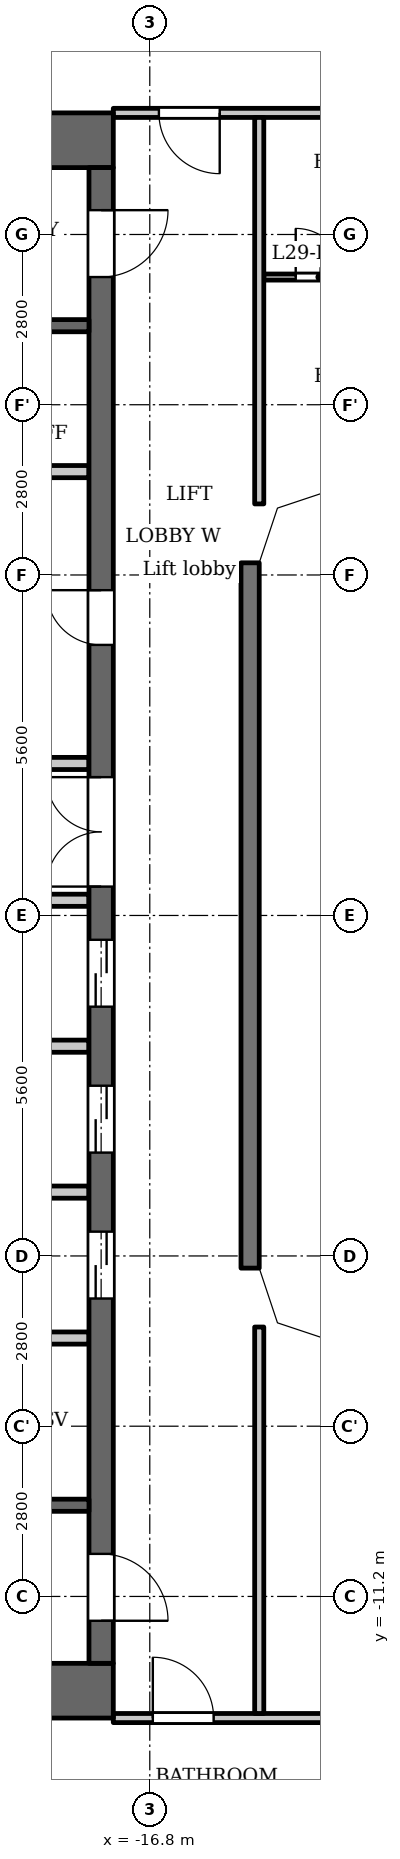
"""IFC4 building model, lengths in metres.
Left out: names, types, materials, properties, quantities, classifications, styles, units other than length and angle.
Written with IfcOpenShell. Run it as: python <this file> out.ifc"""

import sys

from ifc_helpers import new_model, si_unit, direction, frame, frame_2d, origin, place, context, subcontext, project, spatial, polyline, rectangle, outline, extrude, element, fill, save


model = new_model("IFC4")
c1 = context("Model", 3, precision=1e-05, world=origin(), true_north=direction((0.0, 1.0)))
c2 = subcontext(c1, "Body", "Model", "MODEL_VIEW")
j1 = project(units=[si_unit("LENGTHUNIT", "METRE"), si_unit("PLANEANGLEUNIT", "RADIAN")], contexts=[c1])
p1 = place(None, origin())
s1 = spatial("IfcSite", under=j1, at=p1, CompositionType="ELEMENT")
p2 = place(p1, origin())
s2 = spatial("IfcBuilding", under=s1, at=p2, CompositionType="ELEMENT")
p3 = place(p2, frame((0.0, 0.0, 114.8)))
s3 = spatial("IfcBuildingStorey", under=s2, at=p3, CompositionType="ELEMENT", Elevation=114.8)
p4 = place(p3, frame((-15.15, -5.8, 0.0), z_axis=(0.0, 0.0, 1.0), x_axis=(0.0, 1.0, 0.0)))
e1 = element("IfcWall", 1, at=p4, inside=s3, PredefinedType="SOLIDWALL", context=c2, shape_type="SweptSolid", body=[
    extrude(rectangle(XDim=11.6, YDim=0.3, at=frame_2d((5.8, 0.0))), origin(), (0.0, 0.0, 1.0), 3.2),
])
for number, where, z_axis, x_axis in (
    (2, (-17.4, 12.75, 0.0), (0.0, 0.0, 1.0), (-1.0, 0.0, 0.0)),
    (3, (-17.4, -12.75, 0.0), (0.0, 0.0, 1.0), (-1.0, 0.0, 0.0)),
):
    element("IfcWall", number, at=place(p3, frame(where, z_axis=z_axis, x_axis=x_axis)), inside=s3, PredefinedType="SHEAR", context=c2, shape_type="SweptSolid", body=[
        extrude(rectangle(XDim=10.4, YDim=0.9, at=frame_2d((5.2, 0.0))), origin(), (0.0, 0.0, 1.0), 3.2),
    ])
p5 = place(p3, frame((-17.6, -12.3, 0.0), z_axis=(0.0, 0.0, 1.0), x_axis=(0.0, 1.0, 0.0)))
e4 = element("IfcWall", 4, at=p5, inside=s3, PredefinedType="SHEAR", context=c2, shape_type="SweptSolid", body=[
    extrude(rectangle(XDim=24.6, YDim=0.4, at=frame_2d((12.3, 0.0))), origin(), (0.0, 0.0, 1.0), 3.2),
])
p6 = place(p5, frame((6.0, 0.0, 0.0)))
e5 = element("IfcOpeningElement", 5, at=p6, cuts=e4, PredefinedType="OPENING", context=c2, shape_type="SweptSolid", body=[
    extrude(rectangle(XDim=1.1, YDim=2.1, at=frame_2d((0.55, 1.05))), frame((0.0, 0.21, 0.0), z_axis=(0.0, -1.0, 0.0), x_axis=(1.0, 0.0, 0.0)), (0.0, 0.0, 1.0), 0.42),
])
p7 = place(p5, frame((8.4, 0.0, 0.0)))
e6 = element("IfcOpeningElement", 6, at=p7, cuts=e4, PredefinedType="OPENING", context=c2, shape_type="SweptSolid", body=[
    extrude(rectangle(XDim=1.1, YDim=2.1, at=frame_2d((0.55, 1.05))), frame((0.0, 0.21, 0.0), z_axis=(0.0, -1.0, 0.0), x_axis=(1.0, 0.0, 0.0)), (0.0, 0.0, 1.0), 0.42),
])
p8 = place(p5, frame((10.8, 0.0, 0.0)))
e7 = element("IfcOpeningElement", 7, at=p8, cuts=e4, PredefinedType="OPENING", context=c2, shape_type="SweptSolid", body=[
    extrude(rectangle(XDim=1.1, YDim=2.1, at=frame_2d((0.55, 1.05))), frame((0.0, 0.21, 0.0), z_axis=(0.0, -1.0, 0.0), x_axis=(1.0, 0.0, 0.0)), (0.0, 0.0, 1.0), 0.42),
])
p9 = place(p5, frame((16.75, 0.0, 0.0)))
e8 = element("IfcOpeningElement", 8, at=p9, cuts=e4, PredefinedType="OPENING", context=c2, shape_type="SweptSolid", body=[
    extrude(rectangle(XDim=0.9, YDim=2.1, at=frame_2d((0.45, 1.05))), frame((0.0, 0.21, 0.0), z_axis=(0.0, -1.0, 0.0), x_axis=(1.0, 0.0, 0.0)), (0.0, 0.0, 1.0), 0.42),
])
p10 = place(p5, frame((22.8, 0.0, 0.0)))
e9 = element("IfcOpeningElement", 9, at=p10, cuts=e4, PredefinedType="OPENING", context=c2, shape_type="SweptSolid", body=[
    extrude(rectangle(XDim=1.1, YDim=2.1, at=frame_2d((0.55, 1.05))), frame((0.0, 0.21, 0.0), z_axis=(0.0, -1.0, 0.0), x_axis=(1.0, 0.0, 0.0)), (0.0, 0.0, 1.0), 0.42),
])
p11 = place(p5, frame((0.7, 0.0, 0.0)))
e10 = element("IfcOpeningElement", 10, at=p11, cuts=e4, PredefinedType="OPENING", context=c2, shape_type="SweptSolid", body=[
    extrude(rectangle(XDim=1.1, YDim=2.1, at=frame_2d((0.55, 1.05))), frame((0.0, 0.21, 0.0), z_axis=(0.0, -1.0, 0.0), x_axis=(1.0, 0.0, 0.0)), (0.0, 0.0, 1.0), 0.42),
])
p12 = place(p5, frame((12.775, 0.0, 0.0)))
e11 = element("IfcOpeningElement", 11, at=p12, cuts=e4, PredefinedType="OPENING", context=c2, shape_type="SweptSolid", body=[
    extrude(rectangle(XDim=1.8, YDim=2.1, at=frame_2d((0.9, 1.05))), frame((0.0, 0.21, 0.0), z_axis=(0.0, -1.0, 0.0), x_axis=(1.0, 0.0, 0.0)), (0.0, 0.0, 1.0), 0.42),
])
p13 = place(p3, frame((-17.8, -9.7, 0.0), z_axis=(0.0, 0.0, 1.0), x_axis=(-1.0, 0.0, 0.0)))
e12 = element("IfcWall", 12, at=p13, inside=s3, PredefinedType="SHEAR", context=c2, shape_type="SweptSolid", body=[
    extrude(rectangle(XDim=8.3, YDim=0.2, at=frame_2d((4.15, 0.0))), origin(), (0.0, 0.0, 1.0), 3.2),
])
p14 = place(p13, frame((0.85, 0.0, 0.0)))
e13 = element("IfcOpeningElement", 13, at=p14, cuts=e12, PredefinedType="OPENING", context=c2, shape_type="SweptSolid", body=[
    extrude(rectangle(XDim=1.1, YDim=2.1, at=frame_2d((0.55, 1.05))), frame((0.0, 0.11, 0.0), z_axis=(0.0, -1.0, 0.0), x_axis=(1.0, 0.0, 0.0)), (0.0, 0.0, 1.0), 0.22),
])
p15 = place(p13, frame((3.75, 0.0, 0.0)))
e14 = element("IfcOpeningElement", 14, at=p15, cuts=e12, PredefinedType="OPENING", context=c2, shape_type="SweptSolid", body=[
    extrude(rectangle(XDim=1.1, YDim=2.1, at=frame_2d((0.55, 1.05))), frame((0.0, 0.11, 0.0), z_axis=(0.0, -1.0, 0.0), x_axis=(1.0, 0.0, 0.0)), (0.0, 0.0, 1.0), 0.22),
])
for number, where, z_axis, x_axis in (
    (15, (-17.8, -6.95, 0.0), (0.0, 0.0, 1.0), (-1.0, 0.0, 0.0)),
    (16, (-17.8, -4.55, 0.0), (0.0, 0.0, 1.0), (-1.0, 0.0, 0.0)),
    (17, (-17.8, -2.15, 0.0), (0.0, 0.0, 1.0), (-1.0, 0.0, 0.0)),
):
    element("IfcWall", number, at=place(p3, frame(where, z_axis=z_axis, x_axis=x_axis)), inside=s3, PredefinedType="PARTITIONING", context=c2, shape_type="SweptSolid", body=[
        extrude(rectangle(XDim=2.8, YDim=0.2, at=frame_2d((1.4, 0.0))), origin(), (0.0, 0.0, 1.0), 3.2),
    ])
for number, where, z_axis, x_axis in (
    (18, (-17.8, 0.25, 0.0), (0.0, 0.0, 1.0), (-1.0, 0.0, 0.0)),
    (19, (-17.8, 2.5, 0.0), (0.0, 0.0, 1.0), (-1.0, 0.0, 0.0)),
):
    element("IfcWall", number, at=place(p3, frame(where, z_axis=z_axis, x_axis=x_axis)), inside=s3, PredefinedType="PARTITIONING", context=c2, shape_type="SweptSolid", body=[
        extrude(rectangle(XDim=3.0, YDim=0.2, at=frame_2d((1.5, 0.0))), origin(), (0.0, 0.0, 1.0), 3.2),
    ])
p16 = place(p3, frame((-17.8, 7.3, 0.0), z_axis=(0.0, 0.0, 1.0), x_axis=(-1.0, 0.0, 0.0)))
e20 = element("IfcWall", 20, at=p16, inside=s3, PredefinedType="PARTITIONING", context=c2, shape_type="SweptSolid", body=[
    extrude(rectangle(XDim=2.8, YDim=0.2, at=frame_2d((1.4, 0.0))), origin(), (0.0, 0.0, 1.0), 3.2),
])
p17 = place(p3, frame((-17.8, 9.7, 0.0), z_axis=(0.0, 0.0, 1.0), x_axis=(-1.0, 0.0, 0.0)))
e21 = element("IfcWall", 21, at=p17, inside=s3, PredefinedType="SHEAR", context=c2, shape_type="SweptSolid", body=[
    extrude(rectangle(XDim=8.3, YDim=0.2, at=frame_2d((4.15, 0.0))), origin(), (0.0, 0.0, 1.0), 3.2),
])
p18 = place(p17, frame((0.85, 0.0, 0.0)))
e22 = element("IfcOpeningElement", 22, at=p18, cuts=e21, PredefinedType="OPENING", context=c2, shape_type="SweptSolid", body=[
    extrude(rectangle(XDim=1.1, YDim=2.1, at=frame_2d((0.55, 1.05))), frame((0.0, 0.11, 0.0), z_axis=(0.0, -1.0, 0.0), x_axis=(1.0, 0.0, 0.0)), (0.0, 0.0, 1.0), 0.22),
])
p19 = place(p17, frame((3.75, 0.0, 0.0)))
e23 = element("IfcOpeningElement", 23, at=p19, cuts=e21, PredefinedType="OPENING", context=c2, shape_type="SweptSolid", body=[
    extrude(rectangle(XDim=1.1, YDim=2.1, at=frame_2d((0.55, 1.05))), frame((0.0, 0.11, 0.0), z_axis=(0.0, -1.0, 0.0), x_axis=(1.0, 0.0, 0.0)), (0.0, 0.0, 1.0), 0.22),
])
p20 = place(p3, frame((-17.4, -13.2, 0.0), z_axis=(0.0, 0.0, 1.0), x_axis=(1.0, 0.0, 0.0)))
e24 = element("IfcWall", 24, at=p20, inside=s3, PredefinedType="PARTITIONING", context=c2, shape_type="SweptSolid", body=[
    extrude(rectangle(XDim=34.8, YDim=0.15, at=frame_2d((17.4, 0.0))), origin(), (0.0, 0.0, 1.0), 3.2),
])
p21 = place(p20, frame((0.65, 0.0, 0.0)))
e25 = element("IfcOpeningElement", 25, at=p21, cuts=e24, PredefinedType="OPENING", context=c2, shape_type="SweptSolid", body=[
    extrude(rectangle(XDim=1.0, YDim=2.1, at=frame_2d((0.5, 1.05))), frame((0.0, 0.085, 0.0), z_axis=(0.0, -1.0, 0.0), x_axis=(1.0, 0.0, 0.0)), (0.0, 0.0, 1.0), 0.17),
])
p22 = place(p20, frame((33.05, 0.0, 0.0)))
e26 = element("IfcOpeningElement", 26, at=p22, cuts=e24, PredefinedType="OPENING", context=c2, shape_type="SweptSolid", body=[
    extrude(rectangle(XDim=1.0, YDim=2.1, at=frame_2d((0.5, 1.05))), frame((0.0, 0.085, 0.0), z_axis=(0.0, -1.0, 0.0), x_axis=(1.0, 0.0, 0.0)), (0.0, 0.0, 1.0), 0.17),
])
p23 = place(p20, frame((4.55, 0.0, 0.0)))
e27 = element("IfcOpeningElement", 27, at=p23, cuts=e24, PredefinedType="OPENING", context=c2, shape_type="SweptSolid", body=[
    extrude(rectangle(XDim=1.0, YDim=2.1, at=frame_2d((0.5, 1.05))), frame((0.0, 0.085, 0.0), z_axis=(0.0, -1.0, 0.0), x_axis=(1.0, 0.0, 0.0)), (0.0, 0.0, 1.0), 0.17),
])
p24 = place(p20, frame((6.9, 0.0, 0.0)))
e28 = element("IfcOpeningElement", 28, at=p24, cuts=e24, PredefinedType="OPENING", context=c2, shape_type="SweptSolid", body=[
    extrude(rectangle(XDim=1.0, YDim=2.1, at=frame_2d((0.5, 1.05))), frame((0.0, 0.085, 0.0), z_axis=(0.0, -1.0, 0.0), x_axis=(1.0, 0.0, 0.0)), (0.0, 0.0, 1.0), 0.17),
])
p25 = place(p20, frame((15.75, 0.0, 0.0)))
e29 = element("IfcOpeningElement", 29, at=p25, cuts=e24, PredefinedType="OPENING", context=c2, shape_type="SweptSolid", body=[
    extrude(rectangle(XDim=1.0, YDim=2.1, at=frame_2d((0.5, 1.05))), frame((0.0, 0.085, 0.0), z_axis=(0.0, -1.0, 0.0), x_axis=(1.0, 0.0, 0.0)), (0.0, 0.0, 1.0), 0.17),
])
p26 = place(p20, frame((18.1, 0.0, 0.0)))
e30 = element("IfcOpeningElement", 30, at=p26, cuts=e24, PredefinedType="OPENING", context=c2, shape_type="SweptSolid", body=[
    extrude(rectangle(XDim=1.0, YDim=2.1, at=frame_2d((0.5, 1.05))), frame((0.0, 0.085, 0.0), z_axis=(0.0, -1.0, 0.0), x_axis=(1.0, 0.0, 0.0)), (0.0, 0.0, 1.0), 0.17),
])
p27 = place(p20, frame((26.95, 0.0, 0.0)))
e31 = element("IfcOpeningElement", 31, at=p27, cuts=e24, PredefinedType="OPENING", context=c2, shape_type="SweptSolid", body=[
    extrude(rectangle(XDim=1.0, YDim=2.1, at=frame_2d((0.5, 1.05))), frame((0.0, 0.085, 0.0), z_axis=(0.0, -1.0, 0.0), x_axis=(1.0, 0.0, 0.0)), (0.0, 0.0, 1.0), 0.17),
])
p28 = place(p20, frame((29.25, 0.0, 0.0)))
e32 = element("IfcOpeningElement", 32, at=p28, cuts=e24, PredefinedType="OPENING", context=c2, shape_type="SweptSolid", body=[
    extrude(rectangle(XDim=1.0, YDim=2.1, at=frame_2d((0.5, 1.05))), frame((0.0, 0.085, 0.0), z_axis=(0.0, -1.0, 0.0), x_axis=(1.0, 0.0, 0.0)), (0.0, 0.0, 1.0), 0.17),
])
p29 = place(p3, frame((-14.925, 10.5, 0.0), z_axis=(0.0, 0.0, 1.0), x_axis=(1.0, 0.0, 0.0)))
e33 = element("IfcWall", 33, at=p29, inside=s3, PredefinedType="PARTITIONING", context=c2, shape_type="SweptSolid", body=[
    extrude(rectangle(XDim=29.85, YDim=0.1, at=frame_2d((14.925, 0.0))), origin(), (0.0, 0.0, 1.0), 3.2),
])
p30 = place(p29, frame((0.525, 0.0, 0.0)))
e34 = element("IfcOpeningElement", 34, at=p30, cuts=e33, PredefinedType="OPENING", context=c2, shape_type="SweptSolid", body=[
    extrude(rectangle(XDim=0.8, YDim=2.1, at=frame_2d((0.4, 1.05))), frame((0.0, 0.06, 0.0), z_axis=(0.0, -1.0, 0.0), x_axis=(1.0, 0.0, 0.0)), (0.0, 0.0, 1.0), 0.12),
])
p31 = place(p29, frame((4.375, 0.0, 0.0)))
e35 = element("IfcOpeningElement", 35, at=p31, cuts=e33, PredefinedType="OPENING", context=c2, shape_type="SweptSolid", body=[
    extrude(rectangle(XDim=0.9, YDim=2.1, at=frame_2d((0.45, 1.05))), frame((0.0, 0.06, 0.0), z_axis=(0.0, -1.0, 0.0), x_axis=(1.0, 0.0, 0.0)), (0.0, 0.0, 1.0), 0.12),
])
p32 = place(p29, frame((18.825, 0.0, 0.0)))
e36 = element("IfcOpeningElement", 36, at=p32, cuts=e33, PredefinedType="OPENING", context=c2, shape_type="SweptSolid", body=[
    extrude(rectangle(XDim=0.8, YDim=2.1, at=frame_2d((0.4, 1.05))), frame((0.0, 0.06, 0.0), z_axis=(0.0, -1.0, 0.0), x_axis=(1.0, 0.0, 0.0)), (0.0, 0.0, 1.0), 0.12),
])
p33 = place(p29, frame((16.325, 0.0, 0.0)))
e37 = element("IfcOpeningElement", 37, at=p33, cuts=e33, PredefinedType="OPENING", context=c2, shape_type="SweptSolid", body=[
    extrude(rectangle(XDim=0.9, YDim=2.1, at=frame_2d((0.45, 1.05))), frame((0.0, 0.06, 0.0), z_axis=(0.0, -1.0, 0.0), x_axis=(1.0, 0.0, 0.0)), (0.0, 0.0, 1.0), 0.12),
])
p34 = place(p29, frame((10.225, 0.0, 0.0)))
e38 = element("IfcOpeningElement", 38, at=p34, cuts=e33, PredefinedType="OPENING", context=c2, shape_type="SweptSolid", body=[
    extrude(rectangle(XDim=0.9, YDim=2.1, at=frame_2d((0.45, 1.05))), frame((0.0, 0.06, 0.0), z_axis=(0.0, -1.0, 0.0), x_axis=(1.0, 0.0, 0.0)), (0.0, 0.0, 1.0), 0.12),
])
p35 = place(p29, frame((13.325, 0.0, 0.0)))
e39 = element("IfcOpeningElement", 39, at=p35, cuts=e33, PredefinedType="OPENING", context=c2, shape_type="SweptSolid", body=[
    extrude(rectangle(XDim=0.9, YDim=2.1, at=frame_2d((0.45, 1.05))), frame((0.0, 0.06, 0.0), z_axis=(0.0, -1.0, 0.0), x_axis=(1.0, 0.0, 0.0)), (0.0, 0.0, 1.0), 0.12),
])
p36 = place(p29, frame((21.175, 0.0, 0.0)))
e40 = element("IfcOpeningElement", 40, at=p36, cuts=e33, PredefinedType="OPENING", context=c2, shape_type="SweptSolid", body=[
    extrude(rectangle(XDim=0.8, YDim=2.1, at=frame_2d((0.4, 1.05))), frame((0.0, 0.06, 0.0), z_axis=(0.0, -1.0, 0.0), x_axis=(1.0, 0.0, 0.0)), (0.0, 0.0, 1.0), 0.12),
])
p37 = place(p29, frame((26.775, 0.0, 0.0)))
e41 = element("IfcOpeningElement", 41, at=p37, cuts=e33, PredefinedType="OPENING", context=c2, shape_type="SweptSolid", body=[
    extrude(rectangle(XDim=0.9, YDim=2.1, at=frame_2d((0.45, 1.05))), frame((0.0, 0.06, 0.0), z_axis=(0.0, -1.0, 0.0), x_axis=(1.0, 0.0, 0.0)), (0.0, 0.0, 1.0), 0.12),
])
p38 = place(p3, frame((-17.4, 13.2, 0.0), z_axis=(0.0, 0.0, 1.0), x_axis=(1.0, 0.0, 0.0)))
e42 = element("IfcWall", 42, at=p38, inside=s3, PredefinedType="PARTITIONING", context=c2, shape_type="SweptSolid", body=[
    extrude(rectangle(XDim=34.8, YDim=0.15, at=frame_2d((17.4, 0.0))), origin(), (0.0, 0.0, 1.0), 3.2),
])
p39 = place(p38, frame((0.75, 0.0, 0.0)))
e43 = element("IfcOpeningElement", 43, at=p39, cuts=e42, PredefinedType="OPENING", context=c2, shape_type="SweptSolid", body=[
    extrude(rectangle(XDim=1.0, YDim=2.1, at=frame_2d((0.5, 1.05))), frame((0.0, 0.085, 0.0), z_axis=(0.0, -1.0, 0.0), x_axis=(1.0, 0.0, 0.0)), (0.0, 0.0, 1.0), 0.17),
])
p40 = place(p38, frame((33.15, 0.0, 0.0)))
e44 = element("IfcOpeningElement", 44, at=p40, cuts=e42, PredefinedType="OPENING", context=c2, shape_type="SweptSolid", body=[
    extrude(rectangle(XDim=1.0, YDim=2.1, at=frame_2d((0.5, 1.05))), frame((0.0, 0.085, 0.0), z_axis=(0.0, -1.0, 0.0), x_axis=(1.0, 0.0, 0.0)), (0.0, 0.0, 1.0), 0.17),
])
p41 = place(p38, frame((6.85, 0.0, 0.0)))
e45 = element("IfcOpeningElement", 45, at=p41, cuts=e42, PredefinedType="OPENING", context=c2, shape_type="SweptSolid", body=[
    extrude(rectangle(XDim=1.0, YDim=2.1, at=frame_2d((0.5, 1.05))), frame((0.0, 0.085, 0.0), z_axis=(0.0, -1.0, 0.0), x_axis=(1.0, 0.0, 0.0)), (0.0, 0.0, 1.0), 0.17),
])
p42 = place(p38, frame((12.45, 0.0, 0.0)))
e46 = element("IfcOpeningElement", 46, at=p42, cuts=e42, PredefinedType="OPENING", context=c2, shape_type="SweptSolid", body=[
    extrude(rectangle(XDim=1.0, YDim=2.1, at=frame_2d((0.5, 1.05))), frame((0.0, 0.085, 0.0), z_axis=(0.0, -1.0, 0.0), x_axis=(1.0, 0.0, 0.0)), (0.0, 0.0, 1.0), 0.17),
])
p43 = place(p38, frame((29.25, 0.0, 0.0)))
e47 = element("IfcOpeningElement", 47, at=p43, cuts=e42, PredefinedType="OPENING", context=c2, shape_type="SweptSolid", body=[
    extrude(rectangle(XDim=1.0, YDim=2.1, at=frame_2d((0.5, 1.05))), frame((0.0, 0.085, 0.0), z_axis=(0.0, -1.0, 0.0), x_axis=(1.0, 0.0, 0.0)), (0.0, 0.0, 1.0), 0.17),
])
for number, where, z_axis, x_axis in (
    (48, (-15.0, -13.125, 0.0), (0.0, 0.0, 1.0), (0.0, 1.0, 0.0)),
    (49, (-15.0, 6.769, 0.0), (0.0, 0.0, 1.0), (0.0, 1.0, 0.0)),
):
    element("IfcWall", number, at=place(p3, frame(where, z_axis=z_axis, x_axis=x_axis)), inside=s3, PredefinedType="PARTITIONING", context=c2, shape_type="SweptSolid", body=[
        extrude(rectangle(XDim=6.356, YDim=0.15, at=frame_2d((3.178, 0.0))), origin(), (0.0, 0.0, 1.0), 3.2),
    ])
p44 = place(p3, origin())
e50 = element("IfcWall", 50, at=p44, inside=s3, PredefinedType="SOLIDWALL", context=c2, shape_type="SweptSolid", body=[
    extrude(outline(polyline([(-13.849, 7.3), (-14.937, 6.937), (-15.3, 5.849), (-15.3, 5.8), (-15.0, 5.8), (-14.7, 6.7), (-13.8, 7.0), (-13.8, 7.3), (-13.849, 7.3)])), origin(), (0.0, 0.0, 1.0), 3.2),
])
e51 = element("IfcWall", 51, at=p44, inside=s3, PredefinedType="SOLIDWALL", context=c2, shape_type="SweptSolid", body=[
    extrude(outline(polyline([(-14.937, -6.937), (-13.849, -7.3), (-13.8, -7.3), (-13.8, -7.0), (-14.7, -6.7), (-15.0, -5.8), (-15.3, -5.8), (-15.3, -5.849), (-14.937, -6.937)])), origin(), (0.0, 0.0, 1.0), 3.2),
])
p45 = place(p6, origin())
e52 = element("IfcDoor", 52, at=p45, inside=s3, OperationType="DOUBLE_DOOR_SLIDING", PredefinedType="DOOR", context=c2, shape_type="SweptSolid", body=[
    extrude(rectangle(XDim=1.1, YDim=2.1, at=frame_2d((0.55, 1.05))), frame((0.0, 0.025, 0.0), z_axis=(0.0, -1.0, 0.0), x_axis=(1.0, 0.0, 0.0)), (0.0, 0.0, 1.0), 0.05),
])
fill(e5, e52)
p46 = place(p7, origin())
e53 = element("IfcDoor", 53, at=p46, inside=s3, OperationType="DOUBLE_DOOR_SLIDING", PredefinedType="DOOR", context=c2, shape_type="SweptSolid", body=[
    extrude(rectangle(XDim=1.1, YDim=2.1, at=frame_2d((0.55, 1.05))), frame((0.0, 0.025, 0.0), z_axis=(0.0, -1.0, 0.0), x_axis=(1.0, 0.0, 0.0)), (0.0, 0.0, 1.0), 0.05),
])
fill(e6, e53)
p47 = place(p8, origin())
e54 = element("IfcDoor", 54, at=p47, inside=s3, OperationType="DOUBLE_DOOR_SLIDING", PredefinedType="DOOR", context=c2, shape_type="SweptSolid", body=[
    extrude(rectangle(XDim=1.1, YDim=2.1, at=frame_2d((0.55, 1.05))), frame((0.0, 0.025, 0.0), z_axis=(0.0, -1.0, 0.0), x_axis=(1.0, 0.0, 0.0)), (0.0, 0.0, 1.0), 0.05),
])
fill(e7, e54)
p48 = place(p9, origin())
e55 = element("IfcDoor", 55, at=p48, inside=s3, OperationType="SINGLE_SWING_LEFT", PredefinedType="DOOR", context=c2, shape_type="SweptSolid", body=[
    extrude(rectangle(XDim=0.9, YDim=2.1, at=frame_2d((0.45, 1.05))), frame((0.0, 0.025, 0.0), z_axis=(0.0, -1.0, 0.0), x_axis=(1.0, 0.0, 0.0)), (0.0, 0.0, 1.0), 0.05),
])
fill(e8, e55)
p49 = place(p10, origin())
e56 = element("IfcDoor", 56, at=p49, inside=s3, OperationType="SINGLE_SWING_RIGHT", PredefinedType="DOOR", context=c2, shape_type="SweptSolid", body=[
    extrude(rectangle(XDim=1.1, YDim=2.1, at=frame_2d((0.55, 1.05))), frame((0.0, 0.025, 0.0), z_axis=(0.0, -1.0, 0.0), x_axis=(1.0, 0.0, 0.0)), (0.0, 0.0, 1.0), 0.05),
])
fill(e9, e56)
p50 = place(p11, origin())
e57 = element("IfcDoor", 57, at=p50, inside=s3, OperationType="SINGLE_SWING_LEFT", PredefinedType="DOOR", context=c2, shape_type="SweptSolid", body=[
    extrude(rectangle(XDim=1.1, YDim=2.1, at=frame_2d((0.55, 1.05))), frame((0.0, 0.025, 0.0), z_axis=(0.0, -1.0, 0.0), x_axis=(1.0, 0.0, 0.0)), (0.0, 0.0, 1.0), 0.05),
])
fill(e10, e57)
p51 = place(p12, origin())
e58 = element("IfcDoor", 58, at=p51, inside=s3, OperationType="DOUBLE_DOOR_SINGLE_SWING", PredefinedType="DOOR", context=c2, shape_type="SweptSolid", body=[
    extrude(rectangle(XDim=1.8, YDim=2.1, at=frame_2d((0.9, 1.05))), frame((0.0, 0.025, 0.0), z_axis=(0.0, -1.0, 0.0), x_axis=(1.0, 0.0, 0.0)), (0.0, 0.0, 1.0), 0.05),
])
fill(e11, e58)
p52 = place(p39, origin())
e59 = element("IfcDoor", 59, at=p52, inside=s3, OperationType="SINGLE_SWING_RIGHT", PredefinedType="DOOR", context=c2, shape_type="SweptSolid", body=[
    extrude(rectangle(XDim=1.0, YDim=2.1, at=frame_2d((0.5, 1.05))), frame((0.0, 0.025, 0.0), z_axis=(0.0, -1.0, 0.0), x_axis=(1.0, 0.0, 0.0)), (0.0, 0.0, 1.0), 0.05),
])
fill(e43, e59)
p53 = place(p21, origin())
e60 = element("IfcDoor", 60, at=p53, inside=s3, OperationType="SINGLE_SWING_RIGHT", PredefinedType="DOOR", context=c2, shape_type="SweptSolid", body=[
    extrude(rectangle(XDim=1.0, YDim=2.1, at=frame_2d((0.5, 1.05))), frame((0.0, 0.025, 0.0), z_axis=(0.0, -1.0, 0.0), x_axis=(1.0, 0.0, 0.0)), (0.0, 0.0, 1.0), 0.05),
])
fill(e25, e60)
p54 = place(p30, origin())
e61 = element("IfcDoor", 61, at=p54, inside=s3, OperationType="SINGLE_SWING_RIGHT", PredefinedType="DOOR", context=c2, shape_type="SweptSolid", body=[
    extrude(rectangle(XDim=0.8, YDim=2.1, at=frame_2d((0.4, 1.05))), frame((0.0, 0.025, 0.0), z_axis=(0.0, -1.0, 0.0), x_axis=(1.0, 0.0, 0.0)), (0.0, 0.0, 1.0), 0.05),
])
fill(e34, e61)
save(model, sys.argv[1])
